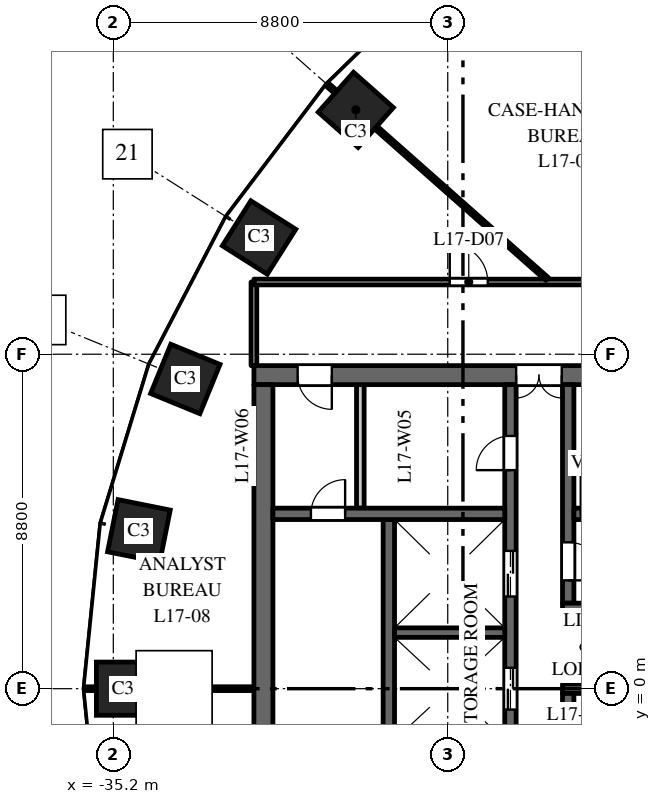
"""IFC4 building model, lengths in metres.
Left out: names, types, materials, properties, quantities, classifications, styles, units other than length and angle.
Written with IfcOpenShell. Run it as: python <this file> out.ifc"""

import sys

from ifc_helpers import new_model, si_unit, direction, frame, frame_2d, origin, origin_2d, place, context, subcontext, project, spatial, rectangle, extrude, element, fill, save


model = new_model("IFC4")
c1 = context("Model", 3, precision=1e-05, world=origin(), true_north=direction((0.0, 1.0)))
c2 = subcontext(c1, "Body", "Model", "MODEL_VIEW")
j1 = project(units=[si_unit("LENGTHUNIT", "METRE"), si_unit("PLANEANGLEUNIT", "RADIAN")], contexts=[c1])
p1 = place(None, origin())
s1 = spatial("IfcSite", under=j1, at=p1, CompositionType="ELEMENT")
p2 = place(p1, origin())
s2 = spatial("IfcBuilding", under=s1, at=p2, CompositionType="ELEMENT")
p3 = place(p2, frame((0.0, 0.0, 78.5)))
s3 = spatial("IfcBuildingStorey", under=s2, at=p3, CompositionType="ELEMENT", Elevation=78.5)
for number, where, z_axis, x_axis in (
    (1, (-28.819, 15.23, 0.0), (0.0, 0.0, 1.0), (-0.663, -0.749, 0.0)),
    (2, (-31.365, 11.871, 0.0), (0.0, 0.0, 1.0), (-0.535, -0.845, 0.0)),
    (3, (-33.305, 8.149, 0.0), (0.0, 0.0, 1.0), (-0.379, -0.925, 0.0)),
    (4, (-34.527, 4.151, 0.0), (0.0, 0.0, 1.0), (-0.197, -0.98, 0.0)),
    (5, (-34.945, 0.0, 0.0), (0.0, 0.0, 1.0), (0.0, -1.0, 0.0)),
):
    element("IfcColumn", number, at=place(p3, frame(where, z_axis=z_axis, x_axis=x_axis)), inside=s3, PredefinedType="COLUMN", context=c2, shape_type="SweptSolid", body=[
        extrude(rectangle(XDim=1.4, YDim=1.4, at=origin_2d()), origin(), (0.0, 0.0, 1.0), 4.0),
    ])
p4 = place(p3, frame((-16.5, 8.25, 0.0), z_axis=(0.0, 0.0, 1.0), x_axis=(-1.0, 0.0, 0.0)))
e6 = element("IfcWall", 6, at=p4, inside=s3, PredefinedType="SHEAR", context=c2, shape_type="SweptSolid", body=[
    extrude(rectangle(XDim=15.0, YDim=0.5, at=frame_2d((7.5, 0.0))), origin(), (0.0, 0.0, 1.0), 3.7),
])
p5 = place(p4, frame((6.9, 0.0, 0.0)))
e7 = element("IfcOpeningElement", 7, at=p5, cuts=e6, PredefinedType="OPENING", context=c2, shape_type="SweptSolid", body=[
    extrude(rectangle(XDim=1.2, YDim=2.1, at=frame_2d((0.6, 1.05))), frame((0.0, 0.26, 0.0), z_axis=(0.0, -1.0, 0.0), x_axis=(1.0, 0.0, 0.0)), (0.0, 0.0, 1.0), 0.52),
])
p6 = place(p4, frame((12.95, 0.0, 0.0)))
e8 = element("IfcOpeningElement", 8, at=p6, cuts=e6, PredefinedType="OPENING", context=c2, shape_type="SweptSolid", body=[
    extrude(rectangle(XDim=0.9, YDim=2.1, at=frame_2d((0.45, 1.05))), frame((0.0, 0.26, 0.0), z_axis=(0.0, -1.0, 0.0), x_axis=(1.0, 0.0, 0.0)), (0.0, 0.0, 1.0), 0.52),
])
p7 = place(p3, frame((-27.95, -4.45, 0.0), z_axis=(0.0, 0.0, 1.0), x_axis=(0.0, 1.0, 0.0)))
e9 = element("IfcWall", 9, at=p7, inside=s3, PredefinedType="SHEAR", context=c2, shape_type="SweptSolid", body=[
    extrude(rectangle(XDim=8.9, YDim=0.3, at=frame_2d((4.45, 0.0))), origin(), (0.0, 0.0, 1.0), 3.7),
])
p8 = place(p3, frame((-24.75, -8.0, 0.0), z_axis=(0.0, 0.0, 1.0), x_axis=(0.0, 1.0, 0.0)))
e10 = element("IfcWall", 10, at=p8, inside=s3, PredefinedType="SHEAR", context=c2, shape_type="SweptSolid", body=[
    extrude(rectangle(XDim=16.0, YDim=0.3, at=frame_2d((8.0, 0.0))), origin(), (0.0, 0.0, 1.0), 3.7),
])
p9 = place(p8, frame((4.425, 0.0, 0.0)))
e11 = element("IfcOpeningElement", 11, at=p9, cuts=e10, PredefinedType="OPENING", context=c2, shape_type="SweptSolid", body=[
    extrude(rectangle(XDim=1.1, YDim=2.1, at=frame_2d((0.55, 1.05))), frame((0.0, 0.16, 0.0), z_axis=(0.0, -1.0, 0.0), x_axis=(1.0, 0.0, 0.0)), (0.0, 0.0, 1.0), 0.32),
])
p10 = place(p8, frame((7.45, 0.0, 0.0)))
e12 = element("IfcOpeningElement", 12, at=p10, cuts=e10, PredefinedType="OPENING", context=c2, shape_type="SweptSolid", body=[
    extrude(rectangle(XDim=1.1, YDim=2.1, at=frame_2d((0.55, 1.05))), frame((0.0, 0.16, 0.0), z_axis=(0.0, -1.0, 0.0), x_axis=(1.0, 0.0, 0.0)), (0.0, 0.0, 1.0), 0.32),
])
p11 = place(p8, frame((10.425, 0.0, 0.0)))
e13 = element("IfcOpeningElement", 13, at=p11, cuts=e10, PredefinedType="OPENING", context=c2, shape_type="SweptSolid", body=[
    extrude(rectangle(XDim=1.2, YDim=2.1, at=frame_2d((0.6, 1.05))), frame((0.0, 0.16, 0.0), z_axis=(0.0, -1.0, 0.0), x_axis=(1.0, 0.0, 0.0)), (0.0, 0.0, 1.0), 0.32),
])
p12 = place(p8, frame((13.75, 0.0, 0.0)))
e14 = element("IfcOpeningElement", 14, at=p12, cuts=e10, PredefinedType="OPENING", context=c2, shape_type="SweptSolid", body=[
    extrude(rectangle(XDim=0.9, YDim=2.1, at=frame_2d((0.45, 1.05))), frame((0.0, 0.16, 0.0), z_axis=(0.0, -1.0, 0.0), x_axis=(1.0, 0.0, 0.0)), (0.0, 0.0, 1.0), 0.32),
])
p13 = place(p8, frame((1.35, 0.0, 0.0)))
e15 = element("IfcOpeningElement", 15, at=p13, cuts=e10, PredefinedType="OPENING", context=c2, shape_type="SweptSolid", body=[
    extrude(rectangle(XDim=0.9, YDim=2.1, at=frame_2d((0.45, 1.05))), frame((0.0, 0.16, 0.0), z_axis=(0.0, -1.0, 0.0), x_axis=(1.0, 0.0, 0.0)), (0.0, 0.0, 1.0), 0.32),
])
p14 = place(p3, frame((-20.1, 0.0, 0.0), z_axis=(0.0, 0.0, 1.0), x_axis=(-1.0, 0.0, 0.0)))
e16 = element("IfcWall", 16, at=p14, inside=s3, PredefinedType="SHEAR", context=c2, shape_type="SweptSolid", body=[
    extrude(rectangle(XDim=3.28, YDim=0.25, at=frame_2d((1.64, 0.0))), origin(), (0.0, 0.0, 1.0), 3.7),
])
p15 = place(p3, frame((-31.25, -8.0, 0.0), z_axis=(0.0, 0.0, 1.0), x_axis=(0.0, 1.0, 0.0)))
e17 = element("IfcWall", 17, at=p15, inside=s3, PredefinedType="SHEAR", context=c2, shape_type="SweptSolid", body=[
    extrude(rectangle(XDim=16.0, YDim=0.5, at=frame_2d((8.0, 0.0))), origin(), (0.0, 0.0, 1.0), 3.7),
])
p16 = place(p3, frame((-24.9, 4.6, 0.0), z_axis=(0.0, 0.0, 1.0), x_axis=(-1.0, 0.0, 0.0)))
e18 = element("IfcWall", 18, at=p16, inside=s3, PredefinedType="SHEAR", context=c2, shape_type="SweptSolid", body=[
    extrude(rectangle(XDim=6.1, YDim=0.3, at=frame_2d((3.05, 0.0))), origin(), (0.0, 0.0, 1.0), 3.7),
])
p17 = place(p16, frame((4.2, 0.0, 0.0)))
e19 = element("IfcOpeningElement", 19, at=p17, cuts=e18, PredefinedType="OPENING", context=c2, shape_type="SweptSolid", body=[
    extrude(rectangle(XDim=0.9, YDim=2.1, at=frame_2d((0.45, 1.05))), frame((0.0, 0.16, 0.0), z_axis=(0.0, -1.0, 0.0), x_axis=(1.0, 0.0, 0.0)), (0.0, 0.0, 1.0), 0.32),
])
p18 = place(p3, frame((-28.7, 4.75, 0.0), z_axis=(0.0, 0.0, 1.0), x_axis=(0.0, 1.0, 0.0)))
e20 = element("IfcWall", 20, at=p18, inside=s3, PredefinedType="PARTITIONING", context=c2, shape_type="SweptSolid", body=[
    extrude(rectangle(XDim=3.25, YDim=0.2, at=frame_2d((1.625, 0.0))), origin(), (0.0, 0.0, 1.0), 3.7),
])
p19 = place(p3, frame((-24.9, 1.475, 0.0), z_axis=(0.0, 0.0, 1.0), x_axis=(-1.0, 0.0, 0.0)))
e21 = element("IfcWall", 21, at=p19, inside=s3, PredefinedType="SHEAR", context=c2, shape_type="SweptSolid", body=[
    extrude(rectangle(XDim=2.9, YDim=0.25, at=frame_2d((1.45, 0.0))), origin(), (0.0, 0.0, 1.0), 3.7),
])
p20 = place(p3, frame((-23.23, 2.25, 0.0), z_axis=(0.0, 0.0, 1.0), x_axis=(0.0, 1.0, 0.0)))
e22 = element("IfcWall", 22, at=p20, inside=s3, PredefinedType="SHEAR", context=c2, shape_type="SweptSolid", body=[
    extrude(rectangle(XDim=5.75, YDim=0.3, at=frame_2d((2.875, 0.0))), origin(), (0.0, 0.0, 1.0), 3.7),
])
p21 = place(p20, frame((0.6, 0.0, 0.0)))
e23 = element("IfcOpeningElement", 23, at=p21, cuts=e22, PredefinedType="OPENING", context=c2, shape_type="SweptSolid", body=[
    extrude(rectangle(XDim=1.0, YDim=2.1, at=frame_2d((0.5, 1.05))), frame((0.0, 0.16, 0.0), z_axis=(0.0, -1.0, 0.0), x_axis=(1.0, 0.0, 0.0)), (0.0, 0.0, 1.0), 0.32),
])
p22 = place(p3, frame((-23.23, -8.0, 0.0), z_axis=(0.0, 0.0, 1.0), x_axis=(0.0, 1.0, 0.0)))
e24 = element("IfcWall", 24, at=p22, inside=s3, PredefinedType="SHEAR", context=c2, shape_type="SweptSolid", body=[
    extrude(rectangle(XDim=7.875, YDim=0.3, at=frame_2d((3.938, 0.0))), origin(), (0.0, 0.0, 1.0), 3.7),
])
p23 = place(p22, frame((5.15, 0.0, 0.0)))
e25 = element("IfcOpeningElement", 25, at=p23, cuts=e24, PredefinedType="OPENING", context=c2, shape_type="SweptSolid", body=[
    extrude(rectangle(XDim=1.1, YDim=2.1, at=frame_2d((0.55, 1.05))), frame((0.0, 0.16, 0.0), z_axis=(0.0, -1.0, 0.0), x_axis=(1.0, 0.0, 0.0)), (0.0, 0.0, 1.0), 0.32),
])
p24 = place(p3, frame((-16.9, 4.6, 0.0), z_axis=(0.0, 0.0, 1.0), x_axis=(-1.0, 0.0, 0.0)))
e26 = element("IfcWall", 26, at=p24, inside=s3, PredefinedType="SHEAR", context=c2, shape_type="SweptSolid", body=[
    extrude(rectangle(XDim=6.18, YDim=0.3, at=frame_2d((3.09, 0.0))), origin(), (0.0, 0.0, 1.0), 3.7),
])
p25 = place(p24, frame((4.9, 0.0, 0.0)))
e27 = element("IfcOpeningElement", 27, at=p25, cuts=e26, PredefinedType="OPENING", context=c2, shape_type="SweptSolid", body=[
    extrude(rectangle(XDim=1.1, YDim=2.1, at=frame_2d((0.55, 1.05))), frame((0.0, 0.16, 0.0), z_axis=(0.0, -1.0, 0.0), x_axis=(1.0, 0.0, 0.0)), (0.0, 0.0, 1.0), 0.32),
])
p26 = place(p3, frame((-20.85, 2.125, 0.0), z_axis=(0.0, 0.0, 1.0), x_axis=(-1.0, 0.0, 0.0)))
e28 = element("IfcWall", 28, at=p26, inside=s3, PredefinedType="SHEAR", context=c2, shape_type="SweptSolid", body=[
    extrude(rectangle(XDim=2.53, YDim=0.25, at=frame_2d((1.265, 0.0))), origin(), (0.0, 0.0, 1.0), 3.7),
])
p27 = place(p3, frame((-35.949, 0.0, 0.0), z_axis=(0.0, 0.0, 1.0), x_axis=(1.0, 0.0, 0.0)))
e29 = element("IfcWall", 29, at=p27, inside=s3, PredefinedType="PARTITIONING", context=c2, shape_type="SweptSolid", body=[
    extrude(rectangle(XDim=4.449, YDim=0.1, at=frame_2d((2.225, 0.0))), origin(), (0.0, 0.0, 1.0), 2.85),
])
p28 = place(p3, frame((-31.5, 8.5, 0.0), z_axis=(0.0, 0.0, 1.0), x_axis=(0.0, 1.0, 0.0)))
e30 = element("IfcWall", 30, at=p28, inside=s3, PredefinedType="PARTITIONING", context=c2, shape_type="SweptSolid", body=[
    extrude(rectangle(XDim=2.2, YDim=0.15, at=frame_2d((1.1, 0.0))), origin(), (0.0, 0.0, 1.0), 3.7),
])
p29 = place(p3, frame((-31.5, 10.7, 0.0), z_axis=(0.0, 0.0, 1.0), x_axis=(1.0, 0.0, 0.0)))
e31 = element("IfcWall", 31, at=p29, inside=s3, PredefinedType="PARTITIONING", context=c2, shape_type="SweptSolid", body=[
    extrude(rectangle(XDim=8.961, YDim=0.15, at=frame_2d((4.48, 0.0))), origin(), (0.0, 0.0, 1.0), 3.1),
])
p30 = place(p29, frame((5.153, 0.0, 0.0)))
e32 = element("IfcOpeningElement", 32, at=p30, cuts=e31, PredefinedType="OPENING", context=c2, shape_type="SweptSolid", body=[
    extrude(rectangle(XDim=1.0, YDim=2.1, at=frame_2d((0.5, 1.05))), frame((0.0, 0.085, 0.0), z_axis=(0.0, -1.0, 0.0), x_axis=(1.0, 0.0, 0.0)), (0.0, 0.0, 1.0), 0.17),
])
p31 = place(p3, frame((-29.569, 15.895, 0.0), z_axis=(0.0, 0.0, 1.0), x_axis=(0.748985701008, -0.662586160198, 0.0)))
e33 = element("IfcWall", 33, at=p31, inside=s3, PredefinedType="PARTITIONING", context=c2, shape_type="SweptSolid", body=[
    extrude(rectangle(XDim=7.723, YDim=0.1, at=frame_2d((3.861, 0.0))), origin(), (0.0, 0.0, 1.0), 2.85),
])
p32 = place(p10, origin())
e34 = element("IfcDoor", 34, at=p32, inside=s3, OperationType="DOUBLE_DOOR_SLIDING", PredefinedType="DOOR", context=c2, shape_type="SweptSolid", body=[
    extrude(rectangle(XDim=1.1, YDim=2.1, at=frame_2d((0.55, 1.05))), frame((0.0, 0.025, 0.0), z_axis=(0.0, -1.0, 0.0), x_axis=(1.0, 0.0, 0.0)), (0.0, 0.0, 1.0), 0.05),
])
fill(e12, e34)
p33 = place(p11, origin())
e35 = element("IfcDoor", 35, at=p33, inside=s3, OperationType="DOUBLE_DOOR_SLIDING", PredefinedType="DOOR", context=c2, shape_type="SweptSolid", body=[
    extrude(rectangle(XDim=1.2, YDim=2.1, at=frame_2d((0.6, 1.05))), frame((0.0, 0.025, 0.0), z_axis=(0.0, -1.0, 0.0), x_axis=(1.0, 0.0, 0.0)), (0.0, 0.0, 1.0), 0.05),
])
fill(e13, e35)
p34 = place(p25, origin())
e36 = element("IfcDoor", 36, at=p34, inside=s3, OperationType="SINGLE_SWING_RIGHT", PredefinedType="DOOR", context=c2, shape_type="SweptSolid", body=[
    extrude(rectangle(XDim=1.1, YDim=2.1, at=frame_2d((0.55, 1.05))), frame((0.0, 0.025, 0.0), z_axis=(0.0, -1.0, 0.0), x_axis=(1.0, 0.0, 0.0)), (0.0, 0.0, 1.0), 0.05),
])
fill(e27, e36)
p35 = place(p21, origin())
e37 = element("IfcDoor", 37, at=p35, inside=s3, OperationType="SINGLE_SWING_LEFT", PredefinedType="DOOR", context=c2, shape_type="SweptSolid", body=[
    extrude(rectangle(XDim=1.0, YDim=2.1, at=frame_2d((0.5, 1.05))), frame((0.0, 0.025, 0.0), z_axis=(0.0, -1.0, 0.0), x_axis=(1.0, 0.0, 0.0)), (0.0, 0.0, 1.0), 0.05),
])
fill(e23, e37)
p36 = place(p5, origin())
e38 = element("IfcDoor", 38, at=p36, inside=s3, OperationType="DOUBLE_DOOR_DOUBLE_SWING", PredefinedType="DOOR", context=c2, shape_type="SweptSolid", body=[
    extrude(rectangle(XDim=1.2, YDim=2.1, at=frame_2d((0.6, 1.05))), frame((0.0, 0.025, 0.0), z_axis=(0.0, -1.0, 0.0), x_axis=(1.0, 0.0, 0.0)), (0.0, 0.0, 1.0), 0.05),
])
fill(e7, e38)
p37 = place(p12, origin())
e39 = element("IfcDoor", 39, at=p37, inside=s3, OperationType="SINGLE_SWING_RIGHT", PredefinedType="DOOR", context=c2, shape_type="SweptSolid", body=[
    extrude(rectangle(XDim=0.9, YDim=2.1, at=frame_2d((0.45, 1.05))), frame((0.0, 0.025, 0.0), z_axis=(0.0, -1.0, 0.0), x_axis=(1.0, 0.0, 0.0)), (0.0, 0.0, 1.0), 0.05),
])
fill(e14, e39)
p38 = place(p6, origin())
e40 = element("IfcDoor", 40, at=p38, inside=s3, OperationType="SINGLE_SWING_RIGHT", PredefinedType="DOOR", context=c2, shape_type="SweptSolid", body=[
    extrude(rectangle(XDim=0.9, YDim=2.1, at=frame_2d((0.45, 1.05))), frame((0.0, 0.025, 0.0), z_axis=(0.0, -1.0, 0.0), x_axis=(1.0, 0.0, 0.0)), (0.0, 0.0, 1.0), 0.05),
])
fill(e8, e40)
p39 = place(p17, origin())
e41 = element("IfcDoor", 41, at=p39, inside=s3, OperationType="SINGLE_SWING_LEFT", PredefinedType="DOOR", context=c2, shape_type="SweptSolid", body=[
    extrude(rectangle(XDim=0.9, YDim=2.1, at=frame_2d((0.45, 1.05))), frame((0.0, 0.025, 0.0), z_axis=(0.0, -1.0, 0.0), x_axis=(1.0, 0.0, 0.0)), (0.0, 0.0, 1.0), 0.05),
])
fill(e19, e41)
p40 = place(p30, origin())
e42 = element("IfcDoor", 42, at=p40, inside=s3, OperationType="SINGLE_SWING_LEFT", PredefinedType="DOOR", context=c2, shape_type="SweptSolid", body=[
    extrude(rectangle(XDim=1.0, YDim=2.1, at=frame_2d((0.5, 1.05))), frame((0.0, 0.025, 0.0), z_axis=(0.0, -1.0, 0.0), x_axis=(1.0, 0.0, 0.0)), (0.0, 0.0, 1.0), 0.05),
])
fill(e32, e42)
save(model, sys.argv[1])
